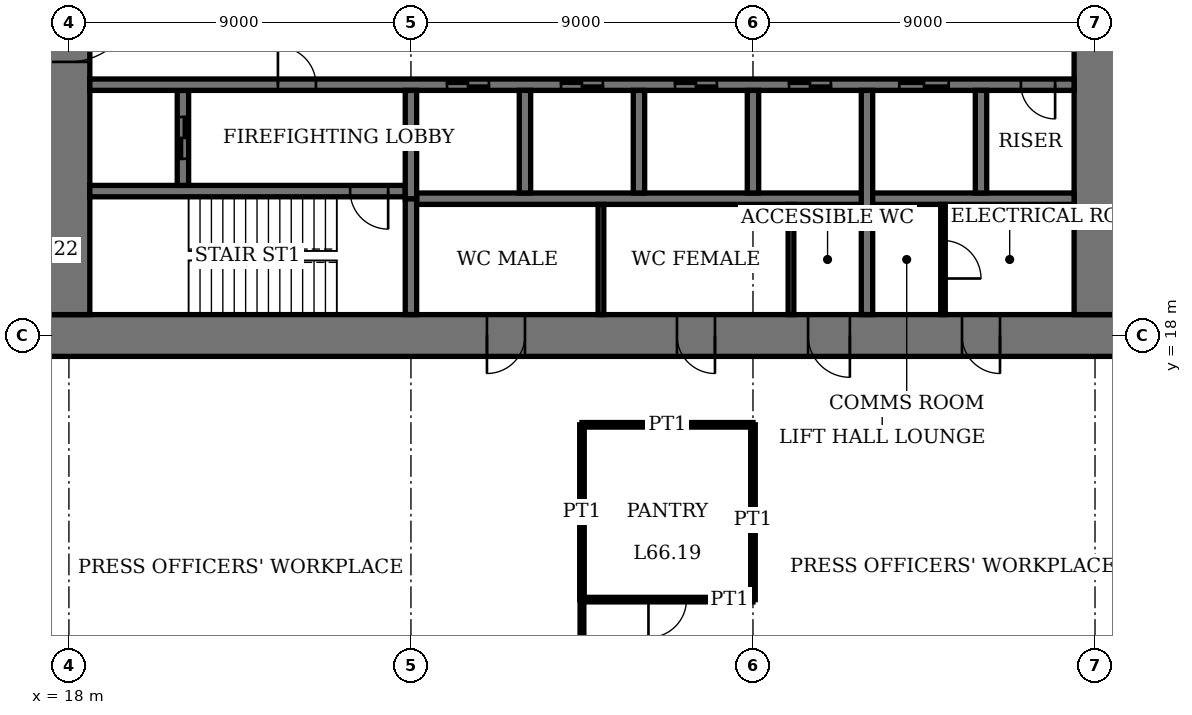
"""IFC4 building model, lengths in metres.
Left out: names, types, materials, properties, quantities, classifications, styles, units other than length and angle.
Written with IfcOpenShell. Run it as: python <this file> out.ifc"""

import sys

from ifc_helpers import new_model, si_unit, direction, frame, frame_2d, origin, place, context, subcontext, project, spatial, rectangle, extrude, element, fill, save


model = new_model("IFC4")
c1 = context("Model", 3, precision=1e-05, world=origin(), true_north=direction((0.0, 1.0)))
c2 = subcontext(c1, "Body", "Model", "MODEL_VIEW")
j1 = project(units=[si_unit("LENGTHUNIT", "METRE"), si_unit("PLANEANGLEUNIT", "RADIAN")], contexts=[c1])
p1 = place(None, origin())
s1 = spatial("IfcSite", under=j1, at=p1, CompositionType="ELEMENT")
p2 = place(p1, origin())
s2 = spatial("IfcBuilding", under=s1, at=p2, CompositionType="ELEMENT")
p3 = place(p2, frame((0.0, 0.0, 271.4)))
s3 = spatial("IfcBuildingStorey", under=s2, at=p3, CompositionType="ELEMENT", Elevation=271.4)
p4 = place(p3, frame((17.45, 18.0, 0.0), z_axis=(0.0, 0.0, 1.0), x_axis=(1.0, 0.0, 0.0)))
e1 = element("IfcWall", 1, at=p4, inside=s3, PredefinedType="SHEAR", context=c2, shape_type="SweptSolid", body=[
    extrude(rectangle(XDim=28.1, YDim=1.1, at=frame_2d((14.05, 0.0))), origin(), (0.0, 0.0, 1.0), 4.0),
])
p5 = place(p4, frame((11.55, 0.0, 0.0)))
e2 = element("IfcOpeningElement", 2, at=p5, cuts=e1, PredefinedType="OPENING", context=c2, shape_type="SweptSolid", body=[
    extrude(rectangle(XDim=1.0, YDim=2.4, at=frame_2d((0.5, 1.2))), frame((0.0, 0.56, 0.0), z_axis=(0.0, -1.0, 0.0), x_axis=(1.0, 0.0, 0.0)), (0.0, 0.0, 1.0), 1.12),
])
p6 = place(p4, frame((16.55, 0.0, 0.0)))
e3 = element("IfcOpeningElement", 3, at=p6, cuts=e1, PredefinedType="OPENING", context=c2, shape_type="SweptSolid", body=[
    extrude(rectangle(XDim=1.0, YDim=2.4, at=frame_2d((0.5, 1.2))), frame((0.0, 0.56, 0.0), z_axis=(0.0, -1.0, 0.0), x_axis=(1.0, 0.0, 0.0)), (0.0, 0.0, 1.0), 1.12),
])
p7 = place(p4, frame((20.0, 0.0, 0.0)))
e4 = element("IfcOpeningElement", 4, at=p7, cuts=e1, PredefinedType="OPENING", context=c2, shape_type="SweptSolid", body=[
    extrude(rectangle(XDim=1.1, YDim=2.4, at=frame_2d((0.55, 1.2))), frame((0.0, 0.56, 0.0), z_axis=(0.0, -1.0, 0.0), x_axis=(1.0, 0.0, 0.0)), (0.0, 0.0, 1.0), 1.12),
])
p8 = place(p4, frame((24.05, 0.0, 0.0)))
e5 = element("IfcOpeningElement", 5, at=p8, cuts=e1, PredefinedType="OPENING", context=c2, shape_type="SweptSolid", body=[
    extrude(rectangle(XDim=1.0, YDim=2.4, at=frame_2d((0.5, 1.2))), frame((0.0, 0.56, 0.0), z_axis=(0.0, -1.0, 0.0), x_axis=(1.0, 0.0, 0.0)), (0.0, 0.0, 1.0), 1.12),
])
p9 = place(p3, frame((18.0, 35.45, 0.0), z_axis=(0.0, 0.0, 1.0), x_axis=(0.0, -1.0, 0.0)))
e6 = element("IfcWall", 6, at=p9, inside=s3, PredefinedType="SHEAR", context=c2, shape_type="SweptSolid", body=[
    extrude(rectangle(XDim=16.9, YDim=1.1, at=frame_2d((8.45, 0.0))), origin(), (0.0, 0.0, 1.0), 4.0),
])
p10 = place(p9, frame((8.45, 0.0, 0.0)))
e7 = element("IfcOpeningElement", 7, at=p10, cuts=e6, PredefinedType="OPENING", context=c2, shape_type="SweptSolid", body=[
    extrude(rectangle(XDim=1.8, YDim=2.4, at=frame_2d((0.9, 1.2))), frame((0.0, 0.56, 0.0), z_axis=(0.0, -1.0, 0.0), x_axis=(1.0, 0.0, 0.0)), (0.0, 0.0, 1.0), 1.12),
])
p11 = place(p3, frame((45.0, 18.55, 0.0), z_axis=(0.0, 0.0, 1.0), x_axis=(0.0, 1.0, 0.0)))
e8 = element("IfcWall", 8, at=p11, inside=s3, PredefinedType="SHEAR", context=c2, shape_type="SweptSolid", body=[
    extrude(rectangle(XDim=16.9, YDim=1.1, at=frame_2d((8.45, 0.0))), origin(), (0.0, 0.0, 1.0), 4.0),
])
p12 = place(p11, frame((8.45, 0.0, 0.0)))
e9 = element("IfcOpeningElement", 9, at=p12, cuts=e8, PredefinedType="OPENING", context=c2, shape_type="SweptSolid", body=[
    extrude(rectangle(XDim=1.8, YDim=2.4, at=frame_2d((0.9, 1.2))), frame((0.0, 0.56, 0.0), z_axis=(0.0, -1.0, 0.0), x_axis=(1.0, 0.0, 0.0)), (0.0, 0.0, 1.0), 1.12),
])
p13 = place(p3, frame((18.55, 21.8, 0.0), z_axis=(0.0, 0.0, 1.0), x_axis=(1.0, 0.0, 0.0)))
e10 = element("IfcWall", 10, at=p13, inside=s3, PredefinedType="SHEAR", context=c2, shape_type="SweptSolid", body=[
    extrude(rectangle(XDim=8.3, YDim=0.3, at=frame_2d((4.15, 0.0))), origin(), (0.0, 0.0, 1.0), 4.0),
])
p14 = place(p13, frame((6.85, 0.0, 0.0)))
e11 = element("IfcOpeningElement", 11, at=p14, cuts=e10, PredefinedType="OPENING", context=c2, shape_type="SweptSolid", body=[
    extrude(rectangle(XDim=1.0, YDim=2.4, at=frame_2d((0.5, 1.2))), frame((0.0, 0.16, 0.0), z_axis=(0.0, -1.0, 0.0), x_axis=(1.0, 0.0, 0.0)), (0.0, 0.0, 1.0), 0.32),
])
p15 = place(p3, frame((27.0, 18.55, 0.0), z_axis=(0.0, 0.0, 1.0), x_axis=(0.0, 1.0, 0.0)))
e12 = element("IfcWall", 12, at=p15, inside=s3, PredefinedType="SHEAR", context=c2, shape_type="SweptSolid", body=[
    extrude(rectangle(XDim=3.05, YDim=0.3, at=frame_2d((1.525, 0.0))), origin(), (0.0, 0.0, 1.0), 4.0),
])
p16 = place(p3, frame((21.0, 21.95, 0.0), z_axis=(0.0, 0.0, 1.0), x_axis=(0.0, 1.0, 0.0)))
e13 = element("IfcWall", 13, at=p16, inside=s3, PredefinedType="SHEAR", context=c2, shape_type="SweptSolid", body=[
    extrude(rectangle(XDim=2.5, YDim=0.3, at=frame_2d((1.25, 0.0))), origin(), (0.0, 0.0, 1.0), 4.0),
])
p17 = place(p16, frame((0.7, 0.0, 0.0)))
e14 = element("IfcOpeningElement", 14, at=p17, cuts=e13, PredefinedType="OPENING", context=c2, shape_type="SweptSolid", body=[
    extrude(rectangle(XDim=1.1, YDim=2.4, at=frame_2d((0.55, 1.2))), frame((0.0, 0.16, 0.0), z_axis=(0.0, -1.0, 0.0), x_axis=(1.0, 0.0, 0.0)), (0.0, 0.0, 1.0), 0.32),
])
p18 = place(p3, frame((18.55, 24.6, 0.0), z_axis=(0.0, 0.0, 1.0), x_axis=(1.0, 0.0, 0.0)))
e15 = element("IfcWall", 15, at=p18, inside=s3, PredefinedType="SHEAR", context=c2, shape_type="SweptSolid", body=[
    extrude(rectangle(XDim=25.9, YDim=0.3, at=frame_2d((12.95, 0.0))), origin(), (0.0, 0.0, 1.0), 4.0),
])
p19 = place(p18, frame((4.95, 0.0, 0.0)))
e16 = element("IfcOpeningElement", 16, at=p19, cuts=e15, PredefinedType="OPENING", context=c2, shape_type="SweptSolid", body=[
    extrude(rectangle(XDim=1.0, YDim=2.4, at=frame_2d((0.5, 1.2))), frame((0.0, 0.16, 0.0), z_axis=(0.0, -1.0, 0.0), x_axis=(1.0, 0.0, 0.0)), (0.0, 0.0, 1.0), 0.32),
])
p20 = place(p18, frame((24.5, 0.0, 0.0)))
e17 = element("IfcOpeningElement", 17, at=p20, cuts=e15, PredefinedType="OPENING", context=c2, shape_type="SweptSolid", body=[
    extrude(rectangle(XDim=0.9, YDim=2.1, at=frame_2d((0.45, 1.05))), frame((0.0, 0.16, 0.0), z_axis=(0.0, -1.0, 0.0), x_axis=(1.0, 0.0, 0.0)), (0.0, 0.0, 1.0), 0.32),
])
p21 = place(p18, frame((9.4, 0.0, 0.0)))
e18 = element("IfcOpeningElement", 18, at=p21, cuts=e15, PredefinedType="OPENING", context=c2, shape_type="SweptSolid", body=[
    extrude(rectangle(XDim=1.1, YDim=2.4, at=frame_2d((0.55, 1.2))), frame((0.0, 0.16, 0.0), z_axis=(0.0, -1.0, 0.0), x_axis=(1.0, 0.0, 0.0)), (0.0, 0.0, 1.0), 0.32),
])
p22 = place(p18, frame((12.4, 0.0, 0.0)))
e19 = element("IfcOpeningElement", 19, at=p22, cuts=e15, PredefinedType="OPENING", context=c2, shape_type="SweptSolid", body=[
    extrude(rectangle(XDim=1.1, YDim=2.4, at=frame_2d((0.55, 1.2))), frame((0.0, 0.16, 0.0), z_axis=(0.0, -1.0, 0.0), x_axis=(1.0, 0.0, 0.0)), (0.0, 0.0, 1.0), 0.32),
])
p23 = place(p18, frame((15.4, 0.0, 0.0)))
e20 = element("IfcOpeningElement", 20, at=p23, cuts=e15, PredefinedType="OPENING", context=c2, shape_type="SweptSolid", body=[
    extrude(rectangle(XDim=1.1, YDim=2.4, at=frame_2d((0.55, 1.2))), frame((0.0, 0.16, 0.0), z_axis=(0.0, -1.0, 0.0), x_axis=(1.0, 0.0, 0.0)), (0.0, 0.0, 1.0), 0.32),
])
p24 = place(p18, frame((18.4, 0.0, 0.0)))
e21 = element("IfcOpeningElement", 21, at=p24, cuts=e15, PredefinedType="OPENING", context=c2, shape_type="SweptSolid", body=[
    extrude(rectangle(XDim=1.1, YDim=2.4, at=frame_2d((0.55, 1.2))), frame((0.0, 0.16, 0.0), z_axis=(0.0, -1.0, 0.0), x_axis=(1.0, 0.0, 0.0)), (0.0, 0.0, 1.0), 0.32),
])
p25 = place(p18, frame((21.3, 0.0, 0.0)))
e22 = element("IfcOpeningElement", 22, at=p25, cuts=e15, PredefinedType="OPENING", context=c2, shape_type="SweptSolid", body=[
    extrude(rectangle(XDim=1.3, YDim=2.4, at=frame_2d((0.65, 1.2))), frame((0.0, 0.16, 0.0), z_axis=(0.0, -1.0, 0.0), x_axis=(1.0, 0.0, 0.0)), (0.0, 0.0, 1.0), 0.32),
])
p26 = place(p3, frame((27.15, 21.6, 0.0), z_axis=(0.0, 0.0, 1.0), x_axis=(1.0, 0.0, 0.0)))
e23 = element("IfcWall", 23, at=p26, inside=s3, PredefinedType="SHEAR", context=c2, shape_type="SweptSolid", body=[
    extrude(rectangle(XDim=17.3, YDim=0.3, at=frame_2d((8.65, 0.0))), origin(), (0.0, 0.0, 1.0), 4.0),
])
for number, where, z_axis, x_axis in (
    (24, (30.0, 21.75, 0.0), (0.0, 0.0, 1.0), (0.0, 1.0, 0.0)),
    (25, (33.0, 21.75, 0.0), (0.0, 0.0, 1.0), (0.0, 1.0, 0.0)),
    (26, (36.0, 21.75, 0.0), (0.0, 0.0, 1.0), (0.0, 1.0, 0.0)),
):
    element("IfcWall", number, at=place(p3, frame(where, z_axis=z_axis, x_axis=x_axis)), inside=s3, PredefinedType="SHEAR", context=c2, shape_type="SweptSolid", body=[
        extrude(rectangle(XDim=2.7, YDim=0.3, at=frame_2d((1.35, 0.0))), origin(), (0.0, 0.0, 1.0), 4.0),
    ])
p27 = place(p3, frame((39.0, 18.55, 0.0), z_axis=(0.0, 0.0, 1.0), x_axis=(0.0, 1.0, 0.0)))
e27 = element("IfcWall", 27, at=p27, inside=s3, PredefinedType="SHEAR", context=c2, shape_type="SweptSolid", body=[
    extrude(rectangle(XDim=5.9, YDim=0.3, at=frame_2d((2.95, 0.0))), origin(), (0.0, 0.0, 1.0), 4.0),
])
p28 = place(p3, frame((42.0, 21.75, 0.0), z_axis=(0.0, 0.0, 1.0), x_axis=(0.0, 1.0, 0.0)))
e28 = element("IfcWall", 28, at=p28, inside=s3, PredefinedType="SHEAR", context=c2, shape_type="SweptSolid", body=[
    extrude(rectangle(XDim=2.7, YDim=0.3, at=frame_2d((1.35, 0.0))), origin(), (0.0, 0.0, 1.0), 4.0),
])
p29 = place(p3, frame((27.0, 21.6, 0.0), z_axis=(0.0, 0.0, 1.0), x_axis=(0.0, 1.0, 0.0)))
e29 = element("IfcWall", 29, at=p29, inside=s3, PredefinedType="SHEAR", context=c2, shape_type="SweptSolid", body=[
    extrude(rectangle(XDim=2.85, YDim=0.3, at=frame_2d((1.425, 0.0))), origin(), (0.0, 0.0, 1.0), 4.0),
])
p30 = place(p3, frame((31.5, 11.05, 0.0), z_axis=(0.0, 0.0, 1.0), x_axis=(1.0, 0.0, 0.0)))
e30 = element("IfcWall", 30, at=p30, inside=s3, PredefinedType="PARTITIONING", context=c2, shape_type="SweptSolid", body=[
    extrude(rectangle(XDim=4.5, YDim=0.12, at=frame_2d((2.25, 0.0))), origin(), (0.0, 0.0, 1.0), 3.75),
])
p31 = place(p30, frame((1.75, 0.0, 0.0)))
e31 = element("IfcOpeningElement", 31, at=p31, cuts=e30, PredefinedType="OPENING", context=c2, shape_type="SweptSolid", body=[
    extrude(rectangle(XDim=1.0, YDim=2.4, at=frame_2d((0.5, 1.2))), frame((0.0, 0.07, 0.0), z_axis=(0.0, -1.0, 0.0), x_axis=(1.0, 0.0, 0.0)), (0.0, 0.0, 1.0), 0.14),
])
p32 = place(p3, frame((31.5, 15.65, 0.0), z_axis=(0.0, 0.0, 1.0), x_axis=(1.0, 0.0, 0.0)))
e32 = element("IfcWall", 32, at=p32, inside=s3, PredefinedType="PARTITIONING", context=c2, shape_type="SweptSolid", body=[
    extrude(rectangle(XDim=4.5, YDim=0.12, at=frame_2d((2.25, 0.0))), origin(), (0.0, 0.0, 1.0), 3.75),
])
p33 = place(p3, frame((31.5, 11.05, 0.0), z_axis=(0.0, 0.0, 1.0), x_axis=(0.0, 1.0, 0.0)))
e33 = element("IfcWall", 33, at=p33, inside=s3, PredefinedType="PARTITIONING", context=c2, shape_type="SweptSolid", body=[
    extrude(rectangle(XDim=4.6, YDim=0.12, at=frame_2d((2.3, 0.0))), origin(), (0.0, 0.0, 1.0), 3.75),
])
p34 = place(p3, frame((31.5, 0.31, 0.0), z_axis=(0.0, 0.0, 1.0), x_axis=(0.0, 1.0, 0.0)))
e34 = element("IfcWall", 34, at=p34, inside=s3, PredefinedType="PARTITIONING", context=c2, shape_type="SweptSolid", body=[
    extrude(rectangle(XDim=10.74, YDim=0.1, at=frame_2d((5.37, 0.0))), origin(), (0.0, 0.0, 1.0), 3.75),
])
p35 = place(p3, frame((36.0, 11.05, 0.0), z_axis=(0.0, 0.0, 1.0), x_axis=(0.0, 1.0, 0.0)))
e35 = element("IfcWall", 35, at=p35, inside=s3, PredefinedType="PARTITIONING", context=c2, shape_type="SweptSolid", body=[
    extrude(rectangle(XDim=4.6, YDim=0.12, at=frame_2d((2.3, 0.0))), origin(), (0.0, 0.0, 1.0), 3.05),
])
for number, where, z_axis, x_axis in (
    (36, (32.0, 18.55, 0.0), (0.0, 0.0, 1.0), (0.0, 1.0, 0.0)),
    (37, (37.0, 18.55, 0.0), (0.0, 0.0, 1.0), (0.0, 1.0, 0.0)),
):
    element("IfcWall", number, at=place(p3, frame(where, z_axis=z_axis, x_axis=x_axis)), inside=s3, PredefinedType="PARTITIONING", context=c2, shape_type="SweptSolid", body=[
        extrude(rectangle(XDim=2.9, YDim=0.15, at=frame_2d((1.45, 0.0))), origin(), (0.0, 0.0, 1.0), 3.75),
    ])
p36 = place(p3, frame((41.0, 18.55, 0.0), z_axis=(0.0, 0.0, 1.0), x_axis=(0.0, 1.0, 0.0)))
e38 = element("IfcWall", 38, at=p36, inside=s3, PredefinedType="PARTITIONING", context=c2, shape_type="SweptSolid", body=[
    extrude(rectangle(XDim=2.9, YDim=0.12, at=frame_2d((1.45, 0.0))), origin(), (0.0, 0.0, 1.0), 3.75),
])
p37 = place(p36, frame((0.95, 0.0, 0.0)))
e39 = element("IfcOpeningElement", 39, at=p37, cuts=e38, PredefinedType="OPENING", context=c2, shape_type="SweptSolid", body=[
    extrude(rectangle(XDim=1.0, YDim=2.4, at=frame_2d((0.5, 1.2))), frame((0.0, 0.07, 0.0), z_axis=(0.0, -1.0, 0.0), x_axis=(1.0, 0.0, 0.0)), (0.0, 0.0, 1.0), 0.14),
])
p38 = place(p10, origin())
e40 = element("IfcDoor", 40, at=p38, inside=s3, OperationType="DOUBLE_DOOR_DOUBLE_SWING", PredefinedType="DOOR", context=c2, shape_type="SweptSolid", body=[
    extrude(rectangle(XDim=1.8, YDim=2.4, at=frame_2d((0.9, 1.2))), frame((0.0, 0.03, 0.0), z_axis=(0.0, -1.0, 0.0), x_axis=(1.0, 0.0, 0.0)), (0.0, 0.0, 1.0), 0.06),
    extrude(rectangle(XDim=0.04, YDim=2.4, at=frame_2d((0.02, 1.2))), frame((0.0, 0.55, 0.0), z_axis=(0.0, -1.0, 0.0), x_axis=(1.0, 0.0, 0.0)), (0.0, 0.0, 1.0), 1.1),
    extrude(rectangle(XDim=0.04, YDim=2.4, at=frame_2d((1.78, 1.2))), frame((0.0, 0.55, 0.0), z_axis=(0.0, -1.0, 0.0), x_axis=(1.0, 0.0, 0.0)), (0.0, 0.0, 1.0), 1.1),
    extrude(rectangle(XDim=1.8, YDim=0.04, at=frame_2d((0.9, 2.38))), frame((0.0, 0.55, 0.0), z_axis=(0.0, -1.0, 0.0), x_axis=(1.0, 0.0, 0.0)), (0.0, 0.0, 1.0), 1.1),
])
fill(e7, e40)
p39 = place(p5, origin())
e41 = element("IfcDoor", 41, at=p39, inside=s3, OperationType="SINGLE_SWING_LEFT", PredefinedType="DOOR", context=c2, shape_type="SweptSolid", body=[
    extrude(rectangle(XDim=1.0, YDim=2.4, at=frame_2d((0.5, 1.2))), frame((0.0, 0.025, 0.0), z_axis=(0.0, -1.0, 0.0), x_axis=(1.0, 0.0, 0.0)), (0.0, 0.0, 1.0), 0.05),
    extrude(rectangle(XDim=0.04, YDim=2.4, at=frame_2d((0.02, 1.2))), frame((0.0, 0.4, 0.0), z_axis=(0.0, -1.0, 0.0), x_axis=(1.0, 0.0, 0.0)), (0.0, 0.0, 1.0), 0.8),
    extrude(rectangle(XDim=0.04, YDim=2.4, at=frame_2d((0.98, 1.2))), frame((0.0, 0.4, 0.0), z_axis=(0.0, -1.0, 0.0), x_axis=(1.0, 0.0, 0.0)), (0.0, 0.0, 1.0), 0.8),
    extrude(rectangle(XDim=1.0, YDim=0.04, at=frame_2d((0.5, 2.38))), frame((0.0, 0.4, 0.0), z_axis=(0.0, -1.0, 0.0), x_axis=(1.0, 0.0, 0.0)), (0.0, 0.0, 1.0), 0.8),
])
fill(e2, e41)
p40 = place(p6, origin())
e42 = element("IfcDoor", 42, at=p40, inside=s3, OperationType="SINGLE_SWING_RIGHT", PredefinedType="DOOR", context=c2, shape_type="SweptSolid", body=[
    extrude(rectangle(XDim=1.0, YDim=2.4, at=frame_2d((0.5, 1.2))), frame((0.0, 0.025, 0.0), z_axis=(0.0, -1.0, 0.0), x_axis=(1.0, 0.0, 0.0)), (0.0, 0.0, 1.0), 0.05),
    extrude(rectangle(XDim=0.04, YDim=2.4, at=frame_2d((0.02, 1.2))), frame((0.0, 0.4, 0.0), z_axis=(0.0, -1.0, 0.0), x_axis=(1.0, 0.0, 0.0)), (0.0, 0.0, 1.0), 0.8),
    extrude(rectangle(XDim=0.04, YDim=2.4, at=frame_2d((0.98, 1.2))), frame((0.0, 0.4, 0.0), z_axis=(0.0, -1.0, 0.0), x_axis=(1.0, 0.0, 0.0)), (0.0, 0.0, 1.0), 0.8),
    extrude(rectangle(XDim=1.0, YDim=0.04, at=frame_2d((0.5, 2.38))), frame((0.0, 0.4, 0.0), z_axis=(0.0, -1.0, 0.0), x_axis=(1.0, 0.0, 0.0)), (0.0, 0.0, 1.0), 0.8),
])
fill(e3, e42)
p41 = place(p7, origin())
e43 = element("IfcDoor", 43, at=p41, inside=s3, OperationType="SINGLE_SWING_RIGHT", PredefinedType="DOOR", context=c2, shape_type="SweptSolid", body=[
    extrude(rectangle(XDim=1.1, YDim=2.4, at=frame_2d((0.55, 1.2))), frame((0.0, 0.025, 0.0), z_axis=(0.0, -1.0, 0.0), x_axis=(1.0, 0.0, 0.0)), (0.0, 0.0, 1.0), 0.05),
    extrude(rectangle(XDim=0.04, YDim=2.4, at=frame_2d((0.02, 1.2))), frame((0.0, 0.44, 0.0), z_axis=(0.0, -1.0, 0.0), x_axis=(1.0, 0.0, 0.0)), (0.0, 0.0, 1.0), 0.88),
    extrude(rectangle(XDim=0.04, YDim=2.4, at=frame_2d((1.08, 1.2))), frame((0.0, 0.44, 0.0), z_axis=(0.0, -1.0, 0.0), x_axis=(1.0, 0.0, 0.0)), (0.0, 0.0, 1.0), 0.88),
    extrude(rectangle(XDim=1.1, YDim=0.04, at=frame_2d((0.55, 2.38))), frame((0.0, 0.44, 0.0), z_axis=(0.0, -1.0, 0.0), x_axis=(1.0, 0.0, 0.0)), (0.0, 0.0, 1.0), 0.88),
])
fill(e4, e43)
p42 = place(p8, origin())
e44 = element("IfcDoor", 44, at=p42, inside=s3, OperationType="SINGLE_SWING_RIGHT", PredefinedType="DOOR", context=c2, shape_type="SweptSolid", body=[
    extrude(rectangle(XDim=1.0, YDim=2.4, at=frame_2d((0.5, 1.2))), frame((0.0, 0.025, 0.0), z_axis=(0.0, -1.0, 0.0), x_axis=(1.0, 0.0, 0.0)), (0.0, 0.0, 1.0), 0.05),
    extrude(rectangle(XDim=0.04, YDim=2.4, at=frame_2d((0.02, 1.2))), frame((0.0, 0.4, 0.0), z_axis=(0.0, -1.0, 0.0), x_axis=(1.0, 0.0, 0.0)), (0.0, 0.0, 1.0), 0.8),
    extrude(rectangle(XDim=0.04, YDim=2.4, at=frame_2d((0.98, 1.2))), frame((0.0, 0.4, 0.0), z_axis=(0.0, -1.0, 0.0), x_axis=(1.0, 0.0, 0.0)), (0.0, 0.0, 1.0), 0.8),
    extrude(rectangle(XDim=1.0, YDim=0.04, at=frame_2d((0.5, 2.38))), frame((0.0, 0.4, 0.0), z_axis=(0.0, -1.0, 0.0), x_axis=(1.0, 0.0, 0.0)), (0.0, 0.0, 1.0), 0.8),
])
fill(e5, e44)
p43 = place(p14, origin())
e45 = element("IfcDoor", 45, at=p43, inside=s3, OperationType="SINGLE_SWING_RIGHT", PredefinedType="DOOR", context=c2, shape_type="SweptSolid", body=[
    extrude(rectangle(XDim=1.0, YDim=2.4, at=frame_2d((0.5, 1.2))), frame((0.0, 0.03, 0.0), z_axis=(0.0, -1.0, 0.0), x_axis=(1.0, 0.0, 0.0)), (0.0, 0.0, 1.0), 0.06),
])
fill(e11, e45)
p44 = place(p19, origin())
e46 = element("IfcDoor", 46, at=p44, inside=s3, OperationType="SINGLE_SWING_RIGHT", PredefinedType="DOOR", context=c2, shape_type="SweptSolid", body=[
    extrude(rectangle(XDim=1.0, YDim=2.4, at=frame_2d((0.5, 1.2))), frame((0.0, 0.03, 0.0), z_axis=(0.0, -1.0, 0.0), x_axis=(1.0, 0.0, 0.0)), (0.0, 0.0, 1.0), 0.06),
])
fill(e16, e46)
p45 = place(p20, origin())
e47 = element("IfcDoor", 47, at=p45, inside=s3, OperationType="SINGLE_SWING_RIGHT", PredefinedType="DOOR", context=c2, shape_type="SweptSolid", body=[
    extrude(rectangle(XDim=0.9, YDim=2.1, at=frame_2d((0.45, 1.05))), frame((0.0, 0.03, 0.0), z_axis=(0.0, -1.0, 0.0), x_axis=(1.0, 0.0, 0.0)), (0.0, 0.0, 1.0), 0.06),
])
fill(e17, e47)
p46 = place(p31, origin())
e48 = element("IfcDoor", 48, at=p46, inside=s3, OperationType="SINGLE_SWING_LEFT", PredefinedType="DOOR", context=c2, shape_type="SweptSolid", body=[
    extrude(rectangle(XDim=1.0, YDim=2.4, at=frame_2d((0.5, 1.2))), frame((0.0, 0.025, 0.0), z_axis=(0.0, -1.0, 0.0), x_axis=(1.0, 0.0, 0.0)), (0.0, 0.0, 1.0), 0.05),
])
fill(e31, e48)
p47 = place(p37, origin())
e49 = element("IfcDoor", 49, at=p47, inside=s3, OperationType="SINGLE_SWING_LEFT", PredefinedType="DOOR", context=c2, shape_type="SweptSolid", body=[
    extrude(rectangle(XDim=1.0, YDim=2.4, at=frame_2d((0.5, 1.2))), frame((0.0, 0.03, 0.0), z_axis=(0.0, -1.0, 0.0), x_axis=(1.0, 0.0, 0.0)), (0.0, 0.0, 1.0), 0.06),
])
fill(e39, e49)
p48 = place(p21, origin())
e50 = element("IfcDoor", 50, at=p48, inside=s3, OperationType="DOUBLE_DOOR_SLIDING", PredefinedType="DOOR", context=c2, shape_type="SweptSolid", body=[
    extrude(rectangle(XDim=1.1, YDim=2.4, at=frame_2d((0.55, 1.2))), frame((0.0, 0.02, 0.0), z_axis=(0.0, -1.0, 0.0), x_axis=(1.0, 0.0, 0.0)), (0.0, 0.0, 1.0), 0.04),
])
fill(e18, e50)
p49 = place(p22, origin())
e51 = element("IfcDoor", 51, at=p49, inside=s3, OperationType="DOUBLE_DOOR_SLIDING", PredefinedType="DOOR", context=c2, shape_type="SweptSolid", body=[
    extrude(rectangle(XDim=1.1, YDim=2.4, at=frame_2d((0.55, 1.2))), frame((0.0, 0.02, 0.0), z_axis=(0.0, -1.0, 0.0), x_axis=(1.0, 0.0, 0.0)), (0.0, 0.0, 1.0), 0.04),
])
fill(e19, e51)
p50 = place(p23, origin())
e52 = element("IfcDoor", 52, at=p50, inside=s3, OperationType="DOUBLE_DOOR_SLIDING", PredefinedType="DOOR", context=c2, shape_type="SweptSolid", body=[
    extrude(rectangle(XDim=1.1, YDim=2.4, at=frame_2d((0.55, 1.2))), frame((0.0, 0.02, 0.0), z_axis=(0.0, -1.0, 0.0), x_axis=(1.0, 0.0, 0.0)), (0.0, 0.0, 1.0), 0.04),
])
fill(e20, e52)
p51 = place(p24, origin())
e53 = element("IfcDoor", 53, at=p51, inside=s3, OperationType="DOUBLE_DOOR_SLIDING", PredefinedType="DOOR", context=c2, shape_type="SweptSolid", body=[
    extrude(rectangle(XDim=1.1, YDim=2.4, at=frame_2d((0.55, 1.2))), frame((0.0, 0.02, 0.0), z_axis=(0.0, -1.0, 0.0), x_axis=(1.0, 0.0, 0.0)), (0.0, 0.0, 1.0), 0.04),
])
fill(e21, e53)
p52 = place(p25, origin())
e54 = element("IfcDoor", 54, at=p52, inside=s3, OperationType="DOUBLE_DOOR_SLIDING", PredefinedType="DOOR", context=c2, shape_type="SweptSolid", body=[
    extrude(rectangle(XDim=1.3, YDim=2.4, at=frame_2d((0.65, 1.2))), frame((0.0, 0.02, 0.0), z_axis=(0.0, -1.0, 0.0), x_axis=(1.0, 0.0, 0.0)), (0.0, 0.0, 1.0), 0.04),
])
fill(e22, e54)
p53 = place(p17, origin())
e55 = element("IfcDoor", 55, at=p53, inside=s3, OperationType="DOUBLE_DOOR_SLIDING", PredefinedType="DOOR", context=c2, shape_type="SweptSolid", body=[
    extrude(rectangle(XDim=1.1, YDim=2.4, at=frame_2d((0.55, 1.2))), frame((0.0, 0.03, 0.0), z_axis=(0.0, -1.0, 0.0), x_axis=(1.0, 0.0, 0.0)), (0.0, 0.0, 1.0), 0.06),
])
fill(e14, e55)
save(model, sys.argv[1])
